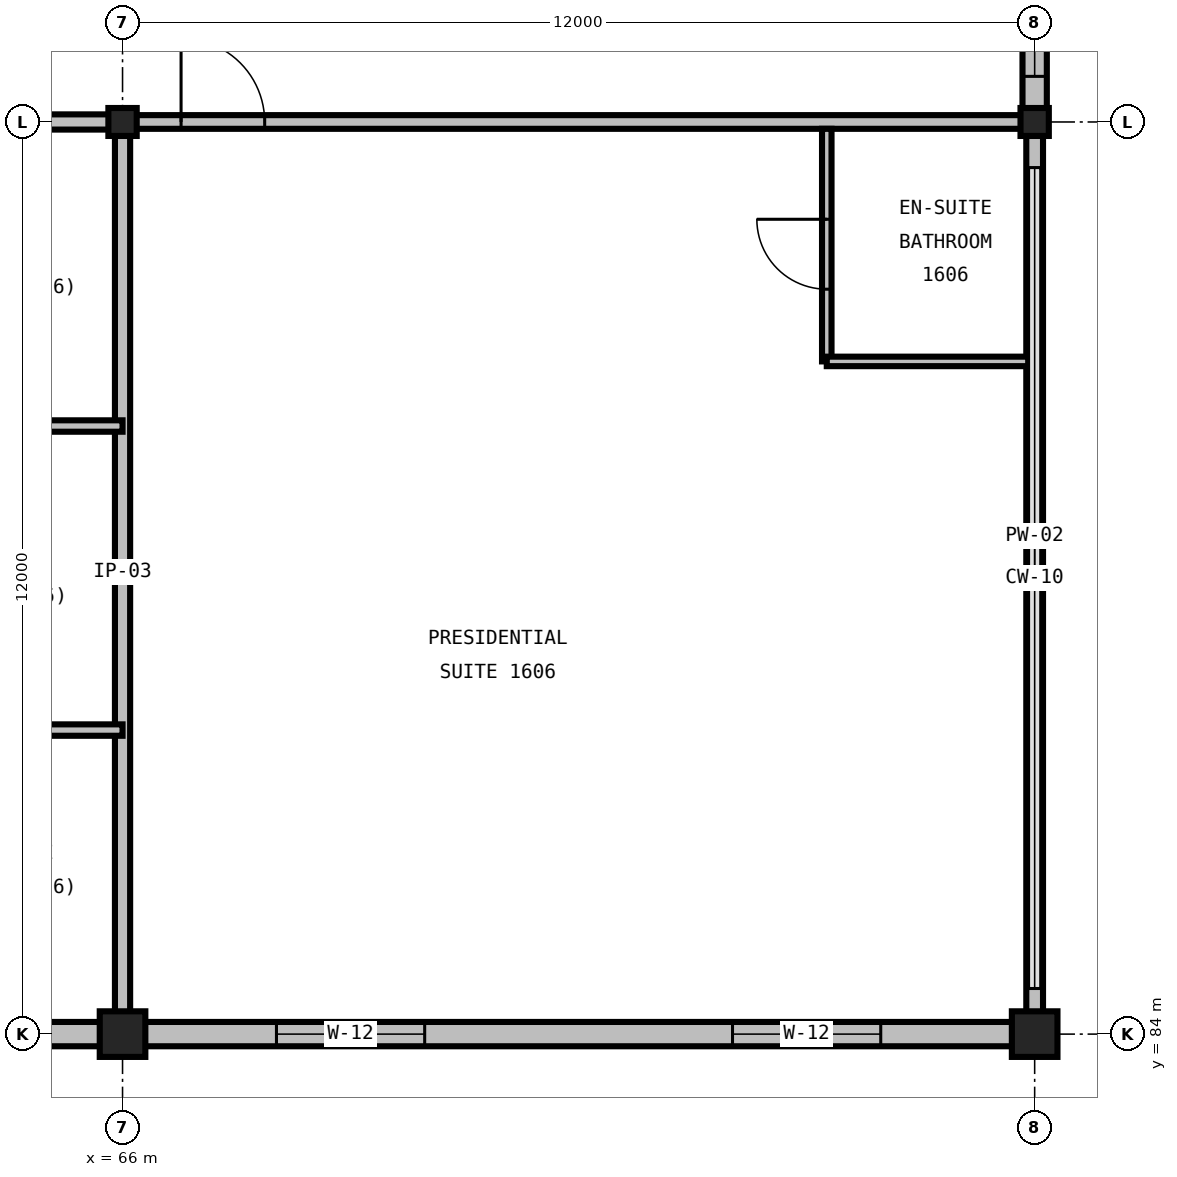
"""IFC4 building model, lengths in metres.
Left out: names, types, materials, properties, quantities, classifications, styles, units other than length and angle.
Written with IfcOpenShell. Run it as: python <this file> out.ifc"""

import sys

from ifc_helpers import new_model, si_unit, direction, frame, frame_2d, origin, origin_2d, place, context, subcontext, project, spatial, rectangle, i_section, extrude, element, fill, save


model = new_model("IFC4")
c1 = context("Model", 3, precision=1e-05, world=origin(), true_north=direction((0.0, 1.0)))
c2 = subcontext(c1, "Body", "Model", "MODEL_VIEW")
j1 = project(units=[si_unit("LENGTHUNIT", "METRE"), si_unit("PLANEANGLEUNIT", "RADIAN")], contexts=[c1])
p1 = place(None, origin())
s1 = spatial("IfcSite", under=j1, at=p1, CompositionType="ELEMENT")
p2 = place(p1, origin())
s2 = spatial("IfcBuilding", under=s1, at=p2, CompositionType="ELEMENT")
p3 = place(p2, frame((0.0, 0.0, 67.2)))
s3 = spatial("IfcBuildingStorey", under=s2, at=p3, CompositionType="ELEMENT", Elevation=67.2)
p4 = place(p3, frame((66.0, 84.0, 0.0), z_axis=(0.0, 0.0, 1.0), x_axis=(1.0, 0.0, 0.0)))
e1 = element("IfcColumn", 1, at=p4, inside=s3, PredefinedType="COLUMN", context=c2, shape_type="SweptSolid", body=[
    extrude(rectangle(XDim=0.6, YDim=0.6, at=origin_2d()), origin(), (0.0, 0.0, 1.0), 3.6),
])
p5 = place(p3, frame((66.0, 96.0, 0.0), z_axis=(0.0, 0.0, 1.0), x_axis=(1.0, 0.0, 0.0)))
e2 = element("IfcColumn", 2, at=p5, inside=s3, PredefinedType="COLUMN", context=c2, shape_type="SweptSolid", body=[
    extrude(i_section(OverallWidth=0.373, OverallDepth=0.368, WebThickness=0.015, FlangeThickness=0.024, FilletRadius=0.031, at=origin_2d()), origin(), (0.0, 0.0, 1.0), 3.6),
])
p6 = place(p3, frame((78.0, 84.0, 0.0), z_axis=(0.0, 0.0, 1.0), x_axis=(1.0, 0.0, 0.0)))
e3 = element("IfcColumn", 3, at=p6, inside=s3, PredefinedType="COLUMN", context=c2, shape_type="SweptSolid", body=[
    extrude(rectangle(XDim=0.6, YDim=0.6, at=origin_2d()), origin(), (0.0, 0.0, 1.0), 3.6),
])
p7 = place(p3, frame((78.0, 96.0, 0.0), z_axis=(0.0, 0.0, 1.0), x_axis=(1.0, 0.0, 0.0)))
e4 = element("IfcColumn", 4, at=p7, inside=s3, PredefinedType="COLUMN", context=c2, shape_type="SweptSolid", body=[
    extrude(i_section(OverallWidth=0.373, OverallDepth=0.368, WebThickness=0.015, FlangeThickness=0.024, FilletRadius=0.031, at=origin_2d()), origin(), (0.0, 0.0, 1.0), 3.6),
])
p8 = place(p3, frame((54.0, 84.0, 0.0), z_axis=(0.0, 0.0, 1.0), x_axis=(1.0, 0.0, 0.0)))
e5 = element("IfcWall", 5, at=p8, inside=s3, PredefinedType="STANDARD", context=c2, shape_type="SweptSolid", body=[
    extrude(rectangle(XDim=12.0, YDim=0.32, at=frame_2d((6.0, 0.0))), origin(), (0.0, 0.0, 1.0), 2.526),
])
p9 = place(p8, frame((2.3, 0.0, 1.0)))
e6 = element("IfcOpeningElement", 6, at=p9, cuts=e5, PredefinedType="OPENING", context=c2, shape_type="SweptSolid", body=[
    extrude(rectangle(XDim=1.4, YDim=1.4, at=frame_2d((0.7, 0.7))), frame((0.0, 0.175, 0.0), z_axis=(0.0, -1.0, 0.0), x_axis=(1.0, 0.0, 0.0)), (0.0, 0.0, 1.0), 0.35),
])
p10 = place(p8, frame((8.25, 0.0, 1.0)))
e7 = element("IfcOpeningElement", 7, at=p10, cuts=e5, PredefinedType="OPENING", context=c2, shape_type="SweptSolid", body=[
    extrude(rectangle(XDim=1.5, YDim=1.35, at=frame_2d((0.75, 0.675))), frame((0.0, 0.175, 0.0), z_axis=(0.0, -1.0, 0.0), x_axis=(1.0, 0.0, 0.0)), (0.0, 0.0, 1.0), 0.35),
])
p11 = place(p3, frame((66.0, 84.0, 0.0), z_axis=(0.0, 0.0, 1.0), x_axis=(1.0, 0.0, 0.0)))
e8 = element("IfcWall", 8, at=p11, inside=s3, PredefinedType="STANDARD", context=c2, shape_type="SweptSolid", body=[
    extrude(rectangle(XDim=12.0, YDim=0.32, at=frame_2d((6.0, 0.0))), origin(), (0.0, 0.0, 1.0), 2.526),
])
p12 = place(p11, frame((2.025, 0.0, 0.65)))
e9 = element("IfcOpeningElement", 9, at=p12, cuts=e8, PredefinedType="OPENING", context=c2, shape_type="SweptSolid", body=[
    extrude(rectangle(XDim=1.95, YDim=1.55, at=frame_2d((0.975, 0.775))), frame((0.0, 0.175, 0.0), z_axis=(0.0, -1.0, 0.0), x_axis=(1.0, 0.0, 0.0)), (0.0, 0.0, 1.0), 0.35),
])
p13 = place(p11, frame((8.025, 0.0, 0.65)))
e10 = element("IfcOpeningElement", 10, at=p13, cuts=e8, PredefinedType="OPENING", context=c2, shape_type="SweptSolid", body=[
    extrude(rectangle(XDim=1.95, YDim=1.55, at=frame_2d((0.975, 0.775))), frame((0.0, 0.175, 0.0), z_axis=(0.0, -1.0, 0.0), x_axis=(1.0, 0.0, 0.0)), (0.0, 0.0, 1.0), 0.35),
])
p14 = place(p3, frame((78.0, 84.0, 0.0), z_axis=(0.0, 0.0, 1.0), x_axis=(0.0, 1.0, 0.0)))
e11 = element("IfcWall", 11, at=p14, inside=s3, PredefinedType="PARAPET", context=c2, shape_type="SweptSolid", body=[
    extrude(rectangle(XDim=12.0, YDim=0.22, at=frame_2d((6.0, 0.0))), origin(), (0.0, 0.0, 1.0), 0.2),
])
p15 = place(p3, frame((78.0, 96.0, 0.0), z_axis=(0.0, 0.0, 1.0), x_axis=(0.0, 1.0, 0.0)))
e12 = element("IfcWall", 12, at=p15, inside=s3, PredefinedType="STANDARD", context=c2, shape_type="SweptSolid", body=[
    extrude(rectangle(XDim=9.0, YDim=0.32, at=frame_2d((4.5, 0.0))), origin(), (0.0, 0.0, 1.0), 2.971),
])
p16 = place(p15, frame((0.6, 0.0, 0.85)))
e13 = element("IfcOpeningElement", 13, at=p16, cuts=e12, PredefinedType="OPENING", context=c2, shape_type="SweptSolid", body=[
    extrude(rectangle(XDim=1.8, YDim=1.5, at=frame_2d((0.9, 0.75))), frame((0.0, 0.175, 0.0), z_axis=(0.0, -1.0, 0.0), x_axis=(1.0, 0.0, 0.0)), (0.0, 0.0, 1.0), 0.35),
])
p17 = place(p3, frame((66.0, 84.16, 0.0), z_axis=(0.0, 0.0, 1.0), x_axis=(0.0, 1.0, 0.0)))
e14 = element("IfcWall", 14, at=p17, inside=s3, PredefinedType="PARTITIONING", context=c2, shape_type="SweptSolid", body=[
    extrude(rectangle(XDim=11.84, YDim=0.2, at=frame_2d((5.92, 0.0))), origin(), (0.0, 0.0, 1.0), 2.58),
])
p18 = place(p3, frame((60.8, 96.0, 0.0), z_axis=(0.0, 0.0, 1.0), x_axis=(1.0, 0.0, 0.0)))
e15 = element("IfcWall", 15, at=p18, inside=s3, PredefinedType="PARTITIONING", context=c2, shape_type="SweptSolid", body=[
    extrude(rectangle(XDim=5.2, YDim=0.2, at=frame_2d((2.6, 0.0))), origin(), (0.0, 0.0, 1.0), 2.349),
])
for number, where, z_axis, x_axis in (
    (16, (60.8, 88.0, 0.0), (0.0, 0.0, 1.0), (1.0, 0.0, 0.0)),
    (17, (60.8, 92.0, 0.0), (0.0, 0.0, 1.0), (1.0, 0.0, 0.0)),
):
    element("IfcWall", number, at=place(p3, frame(where, z_axis=z_axis, x_axis=x_axis)), inside=s3, PredefinedType="PARTITIONING", context=c2, shape_type="SweptSolid", body=[
        extrude(rectangle(XDim=5.2, YDim=0.15, at=frame_2d((2.6, 0.0))), origin(), (0.0, 0.0, 1.0), 3.28),
    ])
p19 = place(p3, frame((66.0, 96.0, 0.0), z_axis=(0.0, 0.0, 1.0), x_axis=(1.0, 0.0, 0.0)))
e18 = element("IfcWall", 18, at=p19, inside=s3, PredefinedType="PARTITIONING", context=c2, shape_type="SweptSolid", body=[
    extrude(rectangle(XDim=11.915, YDim=0.18, at=frame_2d((5.957, 0.0))), origin(), (0.0, 0.0, 1.0), 2.654),
])
p20 = place(p19, frame((0.77, 0.0, 0.0)))
e19 = element("IfcOpeningElement", 19, at=p20, cuts=e18, PredefinedType="OPENING", context=c2, shape_type="SweptSolid", body=[
    extrude(rectangle(XDim=1.1, YDim=2.2, at=frame_2d((0.55, 1.1))), frame((0.0, 0.105, 0.0), z_axis=(0.0, -1.0, 0.0), x_axis=(1.0, 0.0, 0.0)), (0.0, 0.0, 1.0), 0.21),
])
p21 = place(p3, frame((75.265, 92.85, 0.0), z_axis=(0.0, 0.0, 1.0), x_axis=(0.0, 1.0, 0.0)))
e20 = element("IfcWall", 20, at=p21, inside=s3, PredefinedType="PARTITIONING", context=c2, shape_type="SweptSolid", body=[
    extrude(rectangle(XDim=3.06, YDim=0.125, at=frame_2d((1.53, 0.0))), origin(), (0.0, 0.0, 1.0), 3.28),
])
p22 = place(p21, frame((0.95, 0.0, 0.0)))
e21 = element("IfcOpeningElement", 21, at=p22, cuts=e20, PredefinedType="OPENING", context=c2, shape_type="SweptSolid", body=[
    extrude(rectangle(XDim=0.92, YDim=2.1, at=frame_2d((0.46, 1.05))), frame((0.0, 0.077, 0.0), z_axis=(0.0, -1.0, 0.0), x_axis=(1.0, 0.0, 0.0)), (0.0, 0.0, 1.0), 0.155),
])
p23 = place(p3, frame((75.265, 92.85, 0.0), z_axis=(0.0, 0.0, 1.0), x_axis=(1.0, 0.0, 0.0)))
e22 = element("IfcWall", 22, at=p23, inside=s3, PredefinedType="PARTITIONING", context=c2, shape_type="SweptSolid", body=[
    extrude(rectangle(XDim=2.65, YDim=0.125, at=frame_2d((1.325, 0.0))), origin(), (0.0, 0.0, 1.0), 3.28),
])
p24 = place(p12, origin())
e23 = element("IfcWindow", 23, at=p24, inside=s3, PartitioningType="DOUBLE_PANEL_VERTICAL", PredefinedType="WINDOW", context=c2, shape_type="SweptSolid", body=[
    extrude(rectangle(XDim=1.95, YDim=1.55, at=frame_2d((0.975, 0.775))), frame((0.0, 0.03, 0.0), z_axis=(0.0, -1.0, 0.0), x_axis=(1.0, 0.0, 0.0)), (0.0, 0.0, 1.0), 0.06),
])
fill(e9, e23)
p25 = place(p13, origin())
e24 = element("IfcWindow", 24, at=p25, inside=s3, PartitioningType="DOUBLE_PANEL_VERTICAL", PredefinedType="WINDOW", context=c2, shape_type="SweptSolid", body=[
    extrude(rectangle(XDim=1.95, YDim=1.55, at=frame_2d((0.975, 0.775))), frame((0.0, 0.03, 0.0), z_axis=(0.0, -1.0, 0.0), x_axis=(1.0, 0.0, 0.0)), (0.0, 0.0, 1.0), 0.06),
])
fill(e10, e24)
p26 = place(p16, origin())
e25 = element("IfcWindow", 25, at=p26, inside=s3, PartitioningType="SINGLE_PANEL", PredefinedType="WINDOW", context=c2, shape_type="SweptSolid", body=[
    extrude(rectangle(XDim=1.8, YDim=1.5, at=frame_2d((0.9, 0.75))), frame((0.0, 0.03, 0.0), z_axis=(0.0, -1.0, 0.0), x_axis=(1.0, 0.0, 0.0)), (0.0, 0.0, 1.0), 0.06),
])
fill(e13, e25)
p27 = place(p20, origin())
e26 = element("IfcDoor", 26, at=p27, inside=s3, OperationType="SINGLE_SWING_LEFT", PredefinedType="DOOR", context=c2, shape_type="SweptSolid", body=[
    extrude(rectangle(XDim=1.1, YDim=2.2, at=frame_2d((0.55, 1.1))), frame((0.0, 0.025, 0.0), z_axis=(0.0, -1.0, 0.0), x_axis=(1.0, 0.0, 0.0)), (0.0, 0.0, 1.0), 0.05),
])
fill(e19, e26)
p28 = place(p22, origin())
e27 = element("IfcDoor", 27, at=p28, inside=s3, OperationType="SINGLE_SWING_RIGHT", PredefinedType="DOOR", context=c2, shape_type="SweptSolid", body=[
    extrude(rectangle(XDim=0.92, YDim=2.1, at=frame_2d((0.46, 1.05))), frame((0.0, 0.025, 0.0), z_axis=(0.0, -1.0, 0.0), x_axis=(1.0, 0.0, 0.0)), (0.0, 0.0, 1.0), 0.05),
])
fill(e21, e27)
save(model, sys.argv[1])
